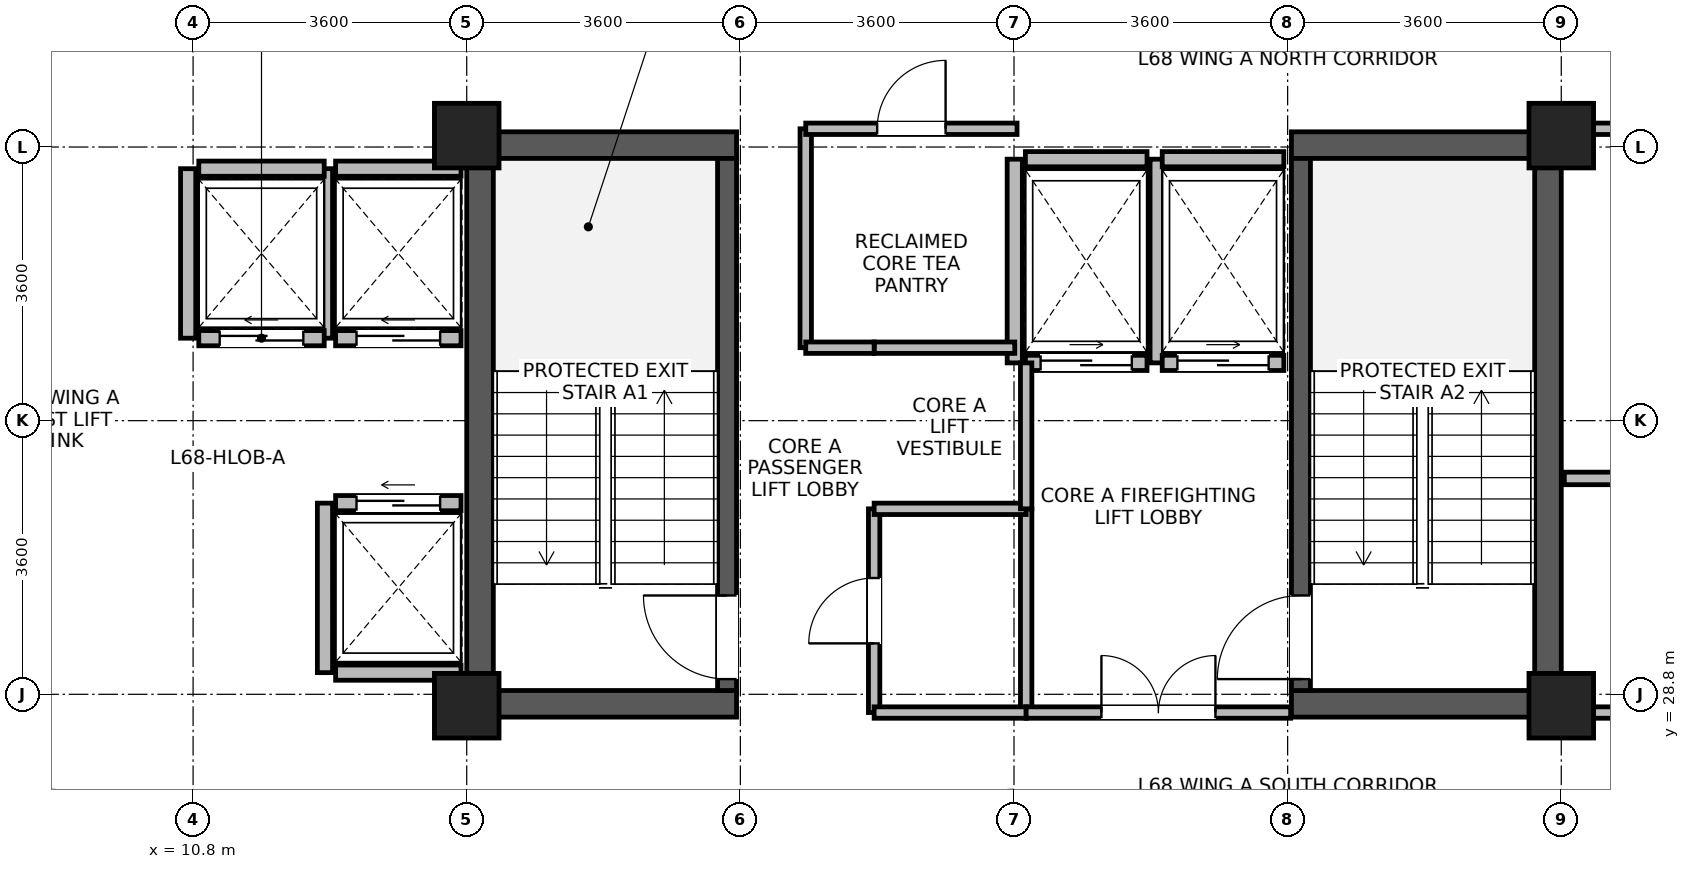
"""IFC4 building model, lengths in metres.
Left out: names, types, materials, properties, quantities, classifications, styles, units other than length and angle.
Written with IfcOpenShell. Run it as: python <this file> out.ifc"""

import sys

from ifc_helpers import new_model, si_unit, direction, frame, frame_2d, origin, origin_2d, place, context, subcontext, project, spatial, rectangle, extrude, source, transform, mapped, element, fill, save


model = new_model("IFC4")
c1 = context("Model", 3, precision=1e-05, world=origin(), true_north=direction((0.0, 1.0)))
c2 = subcontext(c1, "Body", "Model", "MODEL_VIEW")
j1 = project(units=[si_unit("LENGTHUNIT", "METRE"), si_unit("PLANEANGLEUNIT", "RADIAN")], contexts=[c1])
p1 = place(None, origin())
s1 = spatial("IfcSite", under=j1, at=p1, CompositionType="ELEMENT")
p2 = place(p1, origin())
s2 = spatial("IfcBuilding", under=s1, at=p2, CompositionType="ELEMENT")
p3 = place(p2, frame((0.0, 0.0, 264.7)))
s3 = spatial("IfcBuildingStorey", under=s2, at=p3, CompositionType="ELEMENT", Elevation=264.7)
for number, where, z_axis, x_axis in (
    (1, (14.575, 28.5, 0.0), (0.0, 0.0, 1.0), (0.0, 1.0, 0.0)),
    (2, (28.625, 28.5, 0.0), (0.0, 0.0, 1.0), (0.0, 1.0, 0.0)),
):
    element("IfcWall", number, at=place(p3, frame(where, z_axis=z_axis, x_axis=x_axis)), inside=s3, PredefinedType="SHEAR", context=c2, shape_type="SweptSolid", body=[
        extrude(rectangle(XDim=7.7, YDim=0.35, at=frame_2d((3.85, 0.0))), origin(), (0.0, 0.0, 1.0), 3.475),
    ])
for number, where, z_axis, x_axis in (
    (3, (14.75, 28.675, 0.0), (0.0, 0.0, 1.0), (1.0, 0.0, 0.0)),
    (4, (25.25, 28.675, 0.0), (0.0, 0.0, 1.0), (1.0, 0.0, 0.0)),
    (5, (14.75, 36.025, 0.0), (0.0, 0.0, 1.0), (1.0, 0.0, 0.0)),
    (6, (25.25, 36.025, 0.0), (0.0, 0.0, 1.0), (1.0, 0.0, 0.0)),
):
    element("IfcWall", number, at=place(p3, frame(where, z_axis=z_axis, x_axis=x_axis)), inside=s3, PredefinedType="SHEAR", context=c2, shape_type="SweptSolid", body=[
        extrude(rectangle(XDim=3.2, YDim=0.35, at=frame_2d((1.6, 0.0))), origin(), (0.0, 0.0, 1.0), 3.475),
    ])
p4 = place(p3, frame((17.825, 28.85, 0.0), z_axis=(0.0, 0.0, 1.0), x_axis=(0.0, 1.0, 0.0)))
e7 = element("IfcWall", 7, at=p4, inside=s3, PredefinedType="SHEAR", context=c2, shape_type="SweptSolid", body=[
    extrude(rectangle(XDim=7.0, YDim=0.25, at=frame_2d((3.5, 0.0))), origin(), (0.0, 0.0, 1.0), 3.475),
])
p5 = place(p4, frame((0.15, 0.0, 0.0)))
e8 = element("IfcOpeningElement", 8, at=p5, cuts=e7, PredefinedType="OPENING", context=c2, shape_type="SweptSolid", body=[
    extrude(rectangle(XDim=1.1, YDim=2.08, at=frame_2d((0.55, 1.04))), frame((0.0, 0.135, 0.0), z_axis=(0.0, -1.0, 0.0), x_axis=(1.0, 0.0, 0.0)), (0.0, 0.0, 1.0), 0.27),
])
p6 = place(p3, frame((25.375, 28.85, 0.0), z_axis=(0.0, 0.0, 1.0), x_axis=(0.0, 1.0, 0.0)))
e9 = element("IfcWall", 9, at=p6, inside=s3, PredefinedType="SHEAR", context=c2, shape_type="SweptSolid", body=[
    extrude(rectangle(XDim=7.0, YDim=0.25, at=frame_2d((3.5, 0.0))), origin(), (0.0, 0.0, 1.0), 3.475),
])
p7 = place(p6, frame((0.15, 0.0, 0.0)))
e10 = element("IfcOpeningElement", 10, at=p7, cuts=e9, PredefinedType="OPENING", context=c2, shape_type="SweptSolid", body=[
    extrude(rectangle(XDim=1.1, YDim=2.08, at=frame_2d((0.55, 1.04))), frame((0.0, 0.135, 0.0), z_axis=(0.0, -1.0, 0.0), x_axis=(1.0, 0.0, 0.0)), (0.0, 0.0, 1.0), 0.27),
])
m1 = source(origin(), c2, "Body", "SweptSolid", [
    extrude(rectangle(XDim=0.85, YDim=0.85, at=origin_2d()), origin(), (0.0, 0.0, 1.0), 3.7),
])
for number, where, z_axis, x_axis in (
    (11, (14.4, 28.65, 0.0), (0.0, 0.0, 1.0), (1.0, 0.0, 0.0)),
    (12, (14.4, 36.15, 0.0), (0.0, 0.0, 1.0), (1.0, 0.0, 0.0)),
    (13, (28.8, 28.65, 0.0), (0.0, 0.0, 1.0), (1.0, 0.0, 0.0)),
    (14, (28.8, 36.15, 0.0), (0.0, 0.0, 1.0), (1.0, 0.0, 0.0)),
):
    element("IfcColumn", number, at=place(p3, frame(where, z_axis=z_axis, x_axis=x_axis)), inside=s3, PredefinedType="COLUMN", context=c2, shape_type="MappedRepresentation", body=[
        mapped(m1, transform((0.0, 0.0, 0.0), x_axis=(1.0, 0.0, 0.0), y_axis=(0.0, 1.0, 0.0), z_axis=(0.0, 0.0, 1.0), scale=1.0)),
    ])
p8 = place(p3, frame((12.675, 33.485, 0.0), z_axis=(0.0, 0.0, 1.0), x_axis=(1.0, 0.0, 0.0)))
e15 = element("IfcWall", 15, at=p8, inside=s3, PredefinedType="PARTITIONING", context=c2, shape_type="SweptSolid", body=[
    extrude(rectangle(XDim=1.65, YDim=0.2, at=frame_2d((0.825, 0.0))), origin(), (0.0, 0.0, 1.0), 3.455),
])
p9 = place(p8, frame((0.275, 0.0, 0.0)))
e16 = element("IfcOpeningElement", 16, at=p9, cuts=e15, PredefinedType="OPENING", context=c2, shape_type="SweptSolid", body=[
    extrude(rectangle(XDim=1.1, YDim=2.12, at=frame_2d((0.55, 1.06))), frame((0.0, 0.11, 0.0), z_axis=(0.0, -1.0, 0.0), x_axis=(1.0, 0.0, 0.0)), (0.0, 0.0, 1.0), 0.22),
])
p10 = place(p3, frame((12.675, 35.715, 0.0), z_axis=(0.0, 0.0, 1.0), x_axis=(1.0, 0.0, 0.0)))
e17 = element("IfcWall", 17, at=p10, inside=s3, PredefinedType="PARTITIONING", context=c2, shape_type="SweptSolid", body=[
    extrude(rectangle(XDim=1.65, YDim=0.2, at=frame_2d((0.825, 0.0))), origin(), (0.0, 0.0, 1.0), 3.455),
])
p11 = place(p3, frame((12.535, 33.485, 0.0), z_axis=(0.0, 0.0, 1.0), x_axis=(0.0, 1.0, 0.0)))
e18 = element("IfcWall", 18, at=p11, inside=s3, PredefinedType="PARTITIONING", context=c2, shape_type="SweptSolid", body=[
    extrude(rectangle(XDim=2.23, YDim=0.2, at=frame_2d((1.115, 0.0))), origin(), (0.0, 0.0, 1.0), 3.455),
])
p12 = place(p3, frame((12.675, 29.085, 0.0), z_axis=(0.0, 0.0, 1.0), x_axis=(1.0, 0.0, 0.0)))
e19 = element("IfcWall", 19, at=p12, inside=s3, PredefinedType="PARTITIONING", context=c2, shape_type="SweptSolid", body=[
    extrude(rectangle(XDim=1.65, YDim=0.2, at=frame_2d((0.825, 0.0))), origin(), (0.0, 0.0, 1.0), 3.455),
])
p13 = place(p3, frame((12.675, 31.315, 0.0), z_axis=(0.0, 0.0, 1.0), x_axis=(1.0, 0.0, 0.0)))
e20 = element("IfcWall", 20, at=p13, inside=s3, PredefinedType="PARTITIONING", context=c2, shape_type="SweptSolid", body=[
    extrude(rectangle(XDim=1.65, YDim=0.2, at=frame_2d((0.825, 0.0))), origin(), (0.0, 0.0, 1.0), 3.455),
])
p14 = place(p13, frame((0.275, 0.0, 0.0)))
e21 = element("IfcOpeningElement", 21, at=p14, cuts=e20, PredefinedType="OPENING", context=c2, shape_type="SweptSolid", body=[
    extrude(rectangle(XDim=1.1, YDim=2.12, at=frame_2d((0.55, 1.06))), frame((0.0, 0.11, 0.0), z_axis=(0.0, -1.0, 0.0), x_axis=(1.0, 0.0, 0.0)), (0.0, 0.0, 1.0), 0.22),
])
p15 = place(p3, frame((12.535, 29.085, 0.0), z_axis=(0.0, 0.0, 1.0), x_axis=(0.0, 1.0, 0.0)))
e22 = element("IfcWall", 22, at=p15, inside=s3, PredefinedType="PARTITIONING", context=c2, shape_type="SweptSolid", body=[
    extrude(rectangle(XDim=2.23, YDim=0.2, at=frame_2d((1.115, 0.0))), origin(), (0.0, 0.0, 1.0), 3.455),
])
p16 = place(p3, frame((10.875, 33.485, 0.0), z_axis=(0.0, 0.0, 1.0), x_axis=(1.0, 0.0, 0.0)))
e23 = element("IfcWall", 23, at=p16, inside=s3, PredefinedType="PARTITIONING", context=c2, shape_type="SweptSolid", body=[
    extrude(rectangle(XDim=1.65, YDim=0.2, at=frame_2d((0.825, 0.0))), origin(), (0.0, 0.0, 1.0), 3.455),
])
p17 = place(p16, frame((0.275, 0.0, 0.0)))
e24 = element("IfcOpeningElement", 24, at=p17, cuts=e23, PredefinedType="OPENING", context=c2, shape_type="SweptSolid", body=[
    extrude(rectangle(XDim=1.1, YDim=2.12, at=frame_2d((0.55, 1.06))), frame((0.0, 0.11, 0.0), z_axis=(0.0, -1.0, 0.0), x_axis=(1.0, 0.0, 0.0)), (0.0, 0.0, 1.0), 0.22),
])
p18 = place(p3, frame((10.875, 35.715, 0.0), z_axis=(0.0, 0.0, 1.0), x_axis=(1.0, 0.0, 0.0)))
e25 = element("IfcWall", 25, at=p18, inside=s3, PredefinedType="PARTITIONING", context=c2, shape_type="SweptSolid", body=[
    extrude(rectangle(XDim=1.65, YDim=0.2, at=frame_2d((0.825, 0.0))), origin(), (0.0, 0.0, 1.0), 3.455),
])
p19 = place(p3, frame((10.735, 33.485, 0.0), z_axis=(0.0, 0.0, 1.0), x_axis=(0.0, 1.0, 0.0)))
e26 = element("IfcWall", 26, at=p19, inside=s3, PredefinedType="PARTITIONING", context=c2, shape_type="SweptSolid", body=[
    extrude(rectangle(XDim=2.23, YDim=0.2, at=frame_2d((1.115, 0.0))), origin(), (0.0, 0.0, 1.0), 3.455),
])
p20 = place(p3, frame((21.75, 33.16, 0.0), z_axis=(0.0, 0.0, 1.0), x_axis=(1.0, 0.0, 0.0)))
e27 = element("IfcWall", 27, at=p20, inside=s3, PredefinedType="PARTITIONING", context=c2, shape_type="SweptSolid", body=[
    extrude(rectangle(XDim=1.6, YDim=0.2, at=frame_2d((0.8, 0.0))), origin(), (0.0, 0.0, 1.0), 3.455),
])
p21 = place(p20, frame((0.2, 0.0, 0.0)))
e28 = element("IfcOpeningElement", 28, at=p21, cuts=e27, PredefinedType="OPENING", context=c2, shape_type="SweptSolid", body=[
    extrude(rectangle(XDim=1.2, YDim=2.12, at=frame_2d((0.6, 1.06))), frame((0.0, 0.11, 0.0), z_axis=(0.0, -1.0, 0.0), x_axis=(1.0, 0.0, 0.0)), (0.0, 0.0, 1.0), 0.22),
])
p22 = place(p3, frame((21.75, 35.84, 0.0), z_axis=(0.0, 0.0, 1.0), x_axis=(1.0, 0.0, 0.0)))
e29 = element("IfcWall", 29, at=p22, inside=s3, PredefinedType="PARTITIONING", context=c2, shape_type="SweptSolid", body=[
    extrude(rectangle(XDim=1.6, YDim=0.2, at=frame_2d((0.8, 0.0))), origin(), (0.0, 0.0, 1.0), 2.555),
])
for number, where, z_axis, x_axis in (
    (30, (21.61, 33.16, 0.0), (0.0, 0.0, 1.0), (0.0, 1.0, 0.0)),
    (31, (23.49, 33.16, 0.0), (0.0, 0.0, 1.0), (0.0, 1.0, 0.0)),
):
    element("IfcWall", number, at=place(p3, frame(where, z_axis=z_axis, x_axis=x_axis)), inside=s3, PredefinedType="PARTITIONING", context=c2, shape_type="SweptSolid", body=[
        extrude(rectangle(XDim=2.68, YDim=0.2, at=frame_2d((1.34, 0.0))), origin(), (0.0, 0.0, 1.0), 3.455),
    ])
p23 = place(p3, frame((23.55, 33.16, 0.0), z_axis=(0.0, 0.0, 1.0), x_axis=(1.0, 0.0, 0.0)))
e32 = element("IfcWall", 32, at=p23, inside=s3, PredefinedType="PARTITIONING", context=c2, shape_type="SweptSolid", body=[
    extrude(rectangle(XDim=1.6, YDim=0.2, at=frame_2d((0.8, 0.0))), origin(), (0.0, 0.0, 1.0), 3.455),
])
p24 = place(p23, frame((0.2, 0.0, 0.0)))
e33 = element("IfcOpeningElement", 33, at=p24, cuts=e32, PredefinedType="OPENING", context=c2, shape_type="SweptSolid", body=[
    extrude(rectangle(XDim=1.2, YDim=2.12, at=frame_2d((0.6, 1.06))), frame((0.0, 0.11, 0.0), z_axis=(0.0, -1.0, 0.0), x_axis=(1.0, 0.0, 0.0)), (0.0, 0.0, 1.0), 0.22),
])
p25 = place(p3, frame((23.55, 35.84, 0.0), z_axis=(0.0, 0.0, 1.0), x_axis=(1.0, 0.0, 0.0)))
e34 = element("IfcWall", 34, at=p25, inside=s3, PredefinedType="PARTITIONING", context=c2, shape_type="SweptSolid", body=[
    extrude(rectangle(XDim=1.6, YDim=0.2, at=frame_2d((0.8, 0.0))), origin(), (0.0, 0.0, 1.0), 2.555),
])
p26 = place(p3, frame((29.225, 28.56, 0.0), z_axis=(0.0, 0.0, 1.0), x_axis=(1.0, 0.0, 0.0)))
e35 = element("IfcWall", 35, at=p26, inside=s3, PredefinedType="PARTITIONING", context=c2, shape_type="SweptSolid", body=[
    extrude(rectangle(XDim=4.135, YDim=0.15, at=frame_2d((2.067, 0.0))), origin(), (0.0, 0.0, 1.0), 2.905),
])
p27 = place(p26, frame((1.637, 0.0, 0.0)))
e36 = element("IfcOpeningElement", 36, at=p27, cuts=e35, PredefinedType="OPENING", context=c2, shape_type="SweptSolid", body=[
    extrude(rectangle(XDim=0.86, YDim=2.02, at=frame_2d((0.43, 1.01))), frame((0.0, 0.085, 0.0), z_axis=(0.0, -1.0, 0.0), x_axis=(1.0, 0.0, 0.0)), (0.0, 0.0, 1.0), 0.17),
])
p28 = place(p3, frame((29.225, 36.24, 0.0), z_axis=(0.0, 0.0, 1.0), x_axis=(1.0, 0.0, 0.0)))
e37 = element("IfcWall", 37, at=p28, inside=s3, PredefinedType="PARTITIONING", context=c2, shape_type="SweptSolid", body=[
    extrude(rectangle(XDim=4.135, YDim=0.15, at=frame_2d((2.067, 0.0))), origin(), (0.0, 0.0, 1.0), 2.905),
])
p29 = place(p28, frame((1.417, 0.0, 0.0)))
e38 = element("IfcOpeningElement", 38, at=p29, cuts=e37, PredefinedType="OPENING", context=c2, shape_type="SweptSolid", body=[
    extrude(rectangle(XDim=1.3, YDim=2.12, at=frame_2d((0.65, 1.06))), frame((0.0, 0.085, 0.0), z_axis=(0.0, -1.0, 0.0), x_axis=(1.0, 0.0, 0.0)), (0.0, 0.0, 1.0), 0.17),
])
p30 = place(p3, frame((18.86, 33.36, 0.0), z_axis=(0.0, 0.0, 1.0), x_axis=(0.0, 1.0, 0.0)))
e39 = element("IfcWall", 39, at=p30, inside=s3, PredefinedType="PARTITIONING", context=c2, shape_type="SweptSolid", body=[
    extrude(rectangle(XDim=2.88, YDim=0.15, at=frame_2d((1.44, 0.0))), origin(), (0.0, 0.0, 1.0), 3.455),
])
p31 = place(p3, frame((18.86, 36.24, 0.0), z_axis=(0.0, 0.0, 1.0), x_axis=(1.0, 0.0, 0.0)))
e40 = element("IfcWall", 40, at=p31, inside=s3, PredefinedType="PARTITIONING", context=c2, shape_type="SweptSolid", body=[
    extrude(rectangle(XDim=2.78, YDim=0.15, at=frame_2d((1.39, 0.0))), origin(), (0.0, 0.0, 1.0), 2.555),
])
p32 = place(p31, frame((0.94, 0.0, 0.0)))
e41 = element("IfcOpeningElement", 41, at=p32, cuts=e40, PredefinedType="OPENING", context=c2, shape_type="SweptSolid", body=[
    extrude(rectangle(XDim=0.9, YDim=2.08, at=frame_2d((0.45, 1.04))), frame((0.0, 0.085, 0.0), z_axis=(0.0, -1.0, 0.0), x_axis=(1.0, 0.0, 0.0)), (0.0, 0.0, 1.0), 0.17),
])
p33 = place(p3, frame((19.76, 28.56, 0.0), z_axis=(0.0, 0.0, 1.0), x_axis=(0.0, 1.0, 0.0)))
e42 = element("IfcWall", 42, at=p33, inside=s3, PredefinedType="PARTITIONING", context=c2, shape_type="SweptSolid", body=[
    extrude(rectangle(XDim=2.68, YDim=0.15, at=frame_2d((1.34, 0.0))), origin(), (0.0, 0.0, 1.0), 3.455),
])
p34 = place(p33, frame((0.91, 0.0, 0.0)))
e43 = element("IfcOpeningElement", 43, at=p34, cuts=e42, PredefinedType="OPENING", context=c2, shape_type="SweptSolid", body=[
    extrude(rectangle(XDim=0.86, YDim=2.02, at=frame_2d((0.43, 1.01))), frame((0.0, 0.085, 0.0), z_axis=(0.0, -1.0, 0.0), x_axis=(1.0, 0.0, 0.0)), (0.0, 0.0, 1.0), 0.17),
])
p35 = place(p3, frame((21.76, 28.56, 0.0), z_axis=(0.0, 0.0, 1.0), x_axis=(0.0, 1.0, 0.0)))
e44 = element("IfcWall", 44, at=p35, inside=s3, PredefinedType="PARTITIONING", context=c2, shape_type="SweptSolid", body=[
    extrude(rectangle(XDim=2.68, YDim=0.15, at=frame_2d((1.34, 0.0))), origin(), (0.0, 0.0, 1.0), 3.455),
])
p36 = place(p3, frame((19.76, 28.56, 0.0), z_axis=(0.0, 0.0, 1.0), x_axis=(1.0, 0.0, 0.0)))
e45 = element("IfcWall", 45, at=p36, inside=s3, PredefinedType="PARTITIONING", context=c2, shape_type="SweptSolid", body=[
    extrude(rectangle(XDim=2.0, YDim=0.15, at=frame_2d((1.0, 0.0))), origin(), (0.0, 0.0, 1.0), 2.555),
])
p37 = place(p3, frame((19.76, 31.24, 0.0), z_axis=(0.0, 0.0, 1.0), x_axis=(1.0, 0.0, 0.0)))
e46 = element("IfcWall", 46, at=p37, inside=s3, PredefinedType="PARTITIONING", context=c2, shape_type="SweptSolid", body=[
    extrude(rectangle(XDim=2.0, YDim=0.15, at=frame_2d((1.0, 0.0))), origin(), (0.0, 0.0, 1.0), 3.455),
])
p38 = place(p3, frame((19.76, 33.36, 0.0), z_axis=(0.0, 0.0, 1.0), x_axis=(1.0, 0.0, 0.0)))
e47 = element("IfcWall", 47, at=p38, inside=s3, PredefinedType="PARTITIONING", context=c2, shape_type="SweptSolid", body=[
    extrude(rectangle(XDim=1.85, YDim=0.15, at=frame_2d((0.925, 0.0))), origin(), (0.0, 0.0, 1.0), 3.455),
])
p39 = place(p3, frame((18.86, 33.36, 0.0), z_axis=(0.0, 0.0, 1.0), x_axis=(1.0, 0.0, 0.0)))
e48 = element("IfcWall", 48, at=p39, inside=s3, PredefinedType="PARTITIONING", context=c2, shape_type="SweptSolid", body=[
    extrude(rectangle(XDim=0.9, YDim=0.15, at=frame_2d((0.45, 0.0))), origin(), (0.0, 0.0, 1.0), 3.455),
])
p40 = place(p3, frame((28.84, 31.64, 0.0), z_axis=(0.0, 0.0, 1.0), x_axis=(1.0, 0.0, 0.0)))
e49 = element("IfcWall", 49, at=p40, inside=s3, PredefinedType="PARTITIONING", context=c2, shape_type="SweptSolid", body=[
    extrude(rectangle(XDim=4.52, YDim=0.165, at=frame_2d((2.26, 0.0))), origin(), (0.0, 0.0, 1.0), 3.455),
])
p41 = place(p3, frame((21.76, 28.56, 0.0), z_axis=(0.0, 0.0, 1.0), x_axis=(1.0, 0.0, 0.0)))
e50 = element("IfcWall", 50, at=p41, inside=s3, PredefinedType="PARTITIONING", context=c2, shape_type="SweptSolid", body=[
    extrude(rectangle(XDim=3.48, YDim=0.15, at=frame_2d((1.74, 0.0))), origin(), (0.0, 0.0, 1.0), 2.555),
])
p42 = place(p41, frame((0.99, 0.0, 0.0)))
e51 = element("IfcOpeningElement", 51, at=p42, cuts=e50, PredefinedType="OPENING", context=c2, shape_type="SweptSolid", body=[
    extrude(rectangle(XDim=1.5, YDim=2.1, at=frame_2d((0.75, 1.05))), frame((0.0, 0.085, 0.0), z_axis=(0.0, -1.0, 0.0), x_axis=(1.0, 0.0, 0.0)), (0.0, 0.0, 1.0), 0.17),
])
p43 = place(p3, frame((21.76, 31.24, 0.0), z_axis=(0.0, 0.0, 1.0), x_axis=(0.0, 1.0, 0.0)))
e52 = element("IfcWall", 52, at=p43, inside=s3, PredefinedType="PARTITIONING", context=c2, shape_type="SweptSolid", body=[
    extrude(rectangle(XDim=1.92, YDim=0.15, at=frame_2d((0.96, 0.0))), origin(), (0.0, 0.0, 1.0), 3.455),
])
p44 = place(p5, origin())
e53 = element("IfcDoor", 53, at=p44, inside=s3, OperationType="SINGLE_SWING_RIGHT", PredefinedType="DOOR", context=c2, shape_type="SweptSolid", body=[
    extrude(rectangle(XDim=1.1, YDim=2.08, at=frame_2d((0.55, 1.04))), frame((0.0, 0.025, 0.0), z_axis=(0.0, -1.0, 0.0), x_axis=(1.0, 0.0, 0.0)), (0.0, 0.0, 1.0), 0.05),
])
fill(e8, e53)
p45 = place(p7, origin())
e54 = element("IfcDoor", 54, at=p45, inside=s3, OperationType="SINGLE_SWING_LEFT", PredefinedType="DOOR", context=c2, shape_type="SweptSolid", body=[
    extrude(rectangle(XDim=1.1, YDim=2.08, at=frame_2d((0.55, 1.04))), frame((0.0, 0.025, 0.0), z_axis=(0.0, -1.0, 0.0), x_axis=(1.0, 0.0, 0.0)), (0.0, 0.0, 1.0), 0.05),
])
fill(e10, e54)
p46 = place(p9, origin())
e55 = element("IfcDoor", 55, at=p46, inside=s3, OperationType="SLIDING_TO_LEFT", PredefinedType="DOOR", context=c2, shape_type="SweptSolid", body=[
    extrude(rectangle(XDim=1.1, YDim=2.12, at=frame_2d((0.55, 1.06))), frame((0.0, 0.025, 0.0), z_axis=(0.0, -1.0, 0.0), x_axis=(1.0, 0.0, 0.0)), (0.0, 0.0, 1.0), 0.05),
])
fill(e16, e55)
p47 = place(p14, origin())
e56 = element("IfcDoor", 56, at=p47, inside=s3, OperationType="SLIDING_TO_LEFT", PredefinedType="DOOR", context=c2, shape_type="SweptSolid", body=[
    extrude(rectangle(XDim=1.1, YDim=2.12, at=frame_2d((0.55, 1.06))), frame((0.0, 0.025, 0.0), z_axis=(0.0, -1.0, 0.0), x_axis=(1.0, 0.0, 0.0)), (0.0, 0.0, 1.0), 0.05),
])
fill(e21, e56)
p48 = place(p17, origin())
e57 = element("IfcDoor", 57, at=p48, inside=s3, OperationType="SLIDING_TO_LEFT", PredefinedType="DOOR", context=c2, shape_type="SweptSolid", body=[
    extrude(rectangle(XDim=1.1, YDim=2.12, at=frame_2d((0.55, 1.06))), frame((0.0, 0.025, 0.0), z_axis=(0.0, -1.0, 0.0), x_axis=(1.0, 0.0, 0.0)), (0.0, 0.0, 1.0), 0.05),
])
fill(e24, e57)
p49 = place(p21, origin())
e58 = element("IfcDoor", 58, at=p49, inside=s3, OperationType="SLIDING_TO_RIGHT", PredefinedType="DOOR", context=c2, shape_type="SweptSolid", body=[
    extrude(rectangle(XDim=1.2, YDim=2.12, at=frame_2d((0.6, 1.06))), frame((0.0, 0.025, 0.0), z_axis=(0.0, -1.0, 0.0), x_axis=(1.0, 0.0, 0.0)), (0.0, 0.0, 1.0), 0.05),
])
fill(e28, e58)
p50 = place(p24, origin())
e59 = element("IfcDoor", 59, at=p50, inside=s3, OperationType="SLIDING_TO_RIGHT", PredefinedType="DOOR", context=c2, shape_type="SweptSolid", body=[
    extrude(rectangle(XDim=1.2, YDim=2.12, at=frame_2d((0.6, 1.06))), frame((0.0, 0.025, 0.0), z_axis=(0.0, -1.0, 0.0), x_axis=(1.0, 0.0, 0.0)), (0.0, 0.0, 1.0), 0.05),
])
fill(e33, e59)
p51 = place(p32, origin())
e60 = element("IfcDoor", 60, at=p51, inside=s3, OperationType="SINGLE_SWING_RIGHT", PredefinedType="DOOR", context=c2, shape_type="SweptSolid", body=[
    extrude(rectangle(XDim=0.9, YDim=2.08, at=frame_2d((0.45, 1.04))), frame((0.0, 0.025, 0.0), z_axis=(0.0, -1.0, 0.0), x_axis=(1.0, 0.0, 0.0)), (0.0, 0.0, 1.0), 0.05),
])
fill(e41, e60)
p52 = place(p34, origin())
e61 = element("IfcDoor", 61, at=p52, inside=s3, OperationType="SINGLE_SWING_LEFT", PredefinedType="DOOR", context=c2, shape_type="SweptSolid", body=[
    extrude(rectangle(XDim=0.86, YDim=2.02, at=frame_2d((0.43, 1.01))), frame((0.0, 0.025, 0.0), z_axis=(0.0, -1.0, 0.0), x_axis=(1.0, 0.0, 0.0)), (0.0, 0.0, 1.0), 0.05),
])
fill(e43, e61)
p53 = place(p42, origin())
e62 = element("IfcDoor", 62, at=p53, inside=s3, OperationType="DOUBLE_DOOR_SINGLE_SWING", PredefinedType="DOOR", context=c2, shape_type="SweptSolid", body=[
    extrude(rectangle(XDim=1.5, YDim=2.1, at=frame_2d((0.75, 1.05))), frame((0.0, 0.025, 0.0), z_axis=(0.0, -1.0, 0.0), x_axis=(1.0, 0.0, 0.0)), (0.0, 0.0, 1.0), 0.05),
])
fill(e51, e62)
save(model, sys.argv[1])
